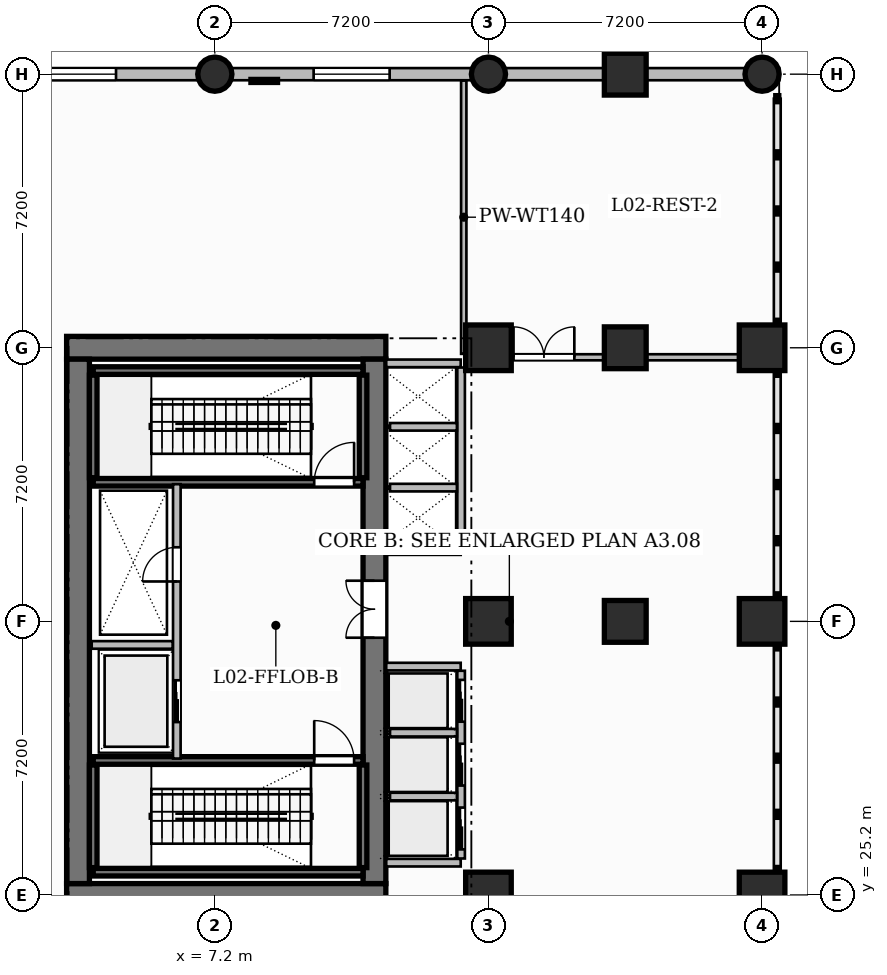
"""IFC4 building model, lengths in metres.
Left out: names, types, materials, properties, quantities, classifications, styles, units other than length and angle.
Written with IfcOpenShell. Run it as: python <this file> out.ifc"""

import sys

from ifc_helpers import new_model, si_unit, direction, frame, frame_2d, origin, origin_2d, place, context, subcontext, project, spatial, rectangle, circle, extrude, source, transform, mapped, element, fill, save


model = new_model("IFC4")
c1 = context("Model", 3, precision=1e-05, world=origin(), true_north=direction((0.0, 1.0)))
c2 = subcontext(c1, "Body", "Model", "MODEL_VIEW")
j1 = project(units=[si_unit("LENGTHUNIT", "METRE"), si_unit("PLANEANGLEUNIT", "RADIAN")], contexts=[c1])
p1 = place(None, origin())
s1 = spatial("IfcSite", under=j1, at=p1, CompositionType="ELEMENT")
p2 = place(p1, origin())
s2 = spatial("IfcBuilding", under=s1, at=p2, CompositionType="ELEMENT")
p3 = place(p2, frame((0.0, 0.0, 10.8)))
s3 = spatial("IfcBuildingStorey", under=s2, at=p3, CompositionType="ELEMENT", Elevation=10.8)
for number, where, z_axis, x_axis in (
    (1, (3.3, 25.2, 0.0), (0.0, 0.0, 1.0), (1.0, 0.0, 0.0)),
    (2, (3.3, 39.6, 0.0), (0.0, 0.0, 1.0), (1.0, 0.0, 0.0)),
):
    element("IfcWall", number, at=place(p3, frame(where, z_axis=z_axis, x_axis=x_axis)), inside=s3, PredefinedType="SHEAR", context=c2, shape_type="SweptSolid", body=[
        extrude(rectangle(XDim=8.4, YDim=0.6, at=frame_2d((4.2, 0.0))), origin(), (0.0, 0.0, 1.0), 5.4),
    ])
p4 = place(p3, frame((3.6, 25.5, 0.0), z_axis=(0.0, 0.0, 1.0), x_axis=(0.0, 1.0, 0.0)))
e3 = element("IfcWall", 3, at=p4, inside=s3, PredefinedType="SHEAR", context=c2, shape_type="SweptSolid", body=[
    extrude(rectangle(XDim=13.8, YDim=0.6, at=frame_2d((6.9, 0.0))), origin(), (0.0, 0.0, 1.0), 5.4),
])
p5 = place(p3, frame((11.4, 25.5, 0.0), z_axis=(0.0, 0.0, 1.0), x_axis=(0.0, 1.0, 0.0)))
e4 = element("IfcWall", 4, at=p5, inside=s3, PredefinedType="SHEAR", context=c2, shape_type="SweptSolid", body=[
    extrude(rectangle(XDim=13.8, YDim=0.6, at=frame_2d((6.9, 0.0))), origin(), (0.0, 0.0, 1.0), 5.4),
])
p6 = place(p5, frame((6.47, 0.0, 0.0)))
e5 = element("IfcOpeningElement", 5, at=p6, cuts=e4, PredefinedType="OPENING", context=c2, shape_type="SweptSolid", body=[
    extrude(rectangle(XDim=1.5, YDim=2.2, at=frame_2d((0.75, 1.1))), frame((0.0, 0.31, 0.0), z_axis=(0.0, -1.0, 0.0), x_axis=(1.0, 0.0, 0.0)), (0.0, 0.0, 1.0), 0.62),
])
m1 = source(origin(), c2, "Body", "SweptSolid", [
    extrude(circle(Radius=0.45, at=origin_2d()), origin(), (0.0, 0.0, 1.0), 5.4),
])
p7 = place(p3, frame((7.2, 46.8, 0.0), z_axis=(0.0, 0.0, 1.0), x_axis=(1.0, 0.0, 0.0)))
e6 = element("IfcColumn", 6, at=p7, inside=s3, PredefinedType="COLUMN", context=c2, shape_type="MappedRepresentation", body=[
    mapped(m1, transform((0.0, 0.0, 0.0), scale=1.0)),
])
m2 = source(origin(), c2, "Body", "SweptSolid", [
    extrude(rectangle(XDim=1.2, YDim=1.2, at=origin_2d()), origin(), (0.0, 0.0, 1.0), 5.4),
])
for number, where, z_axis, x_axis in (
    (7, (14.4, 25.2, 0.0), (0.0, 0.0, 1.0), (1.0, 0.0, 0.0)),
    (8, (14.4, 32.4, 0.0), (0.0, 0.0, 1.0), (1.0, 0.0, 0.0)),
    (9, (14.4, 39.6, 0.0), (0.0, 0.0, 1.0), (1.0, 0.0, 0.0)),
):
    element("IfcColumn", number, at=place(p3, frame(where, z_axis=z_axis, x_axis=x_axis)), inside=s3, PredefinedType="COLUMN", context=c2, shape_type="MappedRepresentation", body=[
        mapped(m2, transform((0.0, 0.0, 0.0), scale=1.0)),
    ])
p8 = place(p3, frame((14.4, 46.8, 0.0), z_axis=(0.0, 0.0, 1.0), x_axis=(1.0, 0.0, 0.0)))
e10 = element("IfcColumn", 10, at=p8, inside=s3, PredefinedType="COLUMN", context=c2, shape_type="MappedRepresentation", body=[
    mapped(m1, transform((0.0, 0.0, 0.0), scale=1.0)),
])
for number, where, z_axis, x_axis in (
    (11, (21.6, 25.2, 0.0), (0.0, 0.0, 1.0), (1.0, 0.0, 0.0)),
    (12, (21.6, 32.4, 0.0), (0.0, 0.0, 1.0), (1.0, 0.0, 0.0)),
    (13, (21.6, 39.6, 0.0), (0.0, 0.0, 1.0), (1.0, 0.0, 0.0)),
):
    element("IfcColumn", number, at=place(p3, frame(where, z_axis=z_axis, x_axis=x_axis)), inside=s3, PredefinedType="COLUMN", context=c2, shape_type="MappedRepresentation", body=[
        mapped(m2, transform((0.0, 0.0, 0.0), scale=1.0)),
    ])
p9 = place(p3, frame((21.6, 46.8, 0.0), z_axis=(0.0, 0.0, 1.0), x_axis=(1.0, 0.0, 0.0)))
e14 = element("IfcColumn", 14, at=p9, inside=s3, PredefinedType="COLUMN", context=c2, shape_type="MappedRepresentation", body=[
    mapped(m1, transform((0.0, 0.0, 0.0), scale=1.0)),
])
m3 = source(origin(), c2, "Body", "SweptSolid", [
    extrude(rectangle(XDim=1.1, YDim=1.1, at=origin_2d()), origin(), (0.0, 0.0, 1.0), 5.4),
])
for number, where, z_axis, x_axis in (
    (15, (18.0, 32.4, 0.0), (0.0, 0.0, 1.0), (1.0, 0.0, 0.0)),
    (16, (18.0, 39.6, 0.0), (0.0, 0.0, 1.0), (1.0, 0.0, 0.0)),
    (17, (18.0, 46.8, 0.0), (0.0, 0.0, 1.0), (1.0, 0.0, 0.0)),
):
    element("IfcColumn", number, at=place(p3, frame(where, z_axis=z_axis, x_axis=x_axis)), inside=s3, PredefinedType="COLUMN", context=c2, shape_type="MappedRepresentation", body=[
        mapped(m3, transform((0.0, 0.0, 0.0), scale=1.0)),
    ])
p10 = place(p3, frame((4.0, 25.8, 0.0), z_axis=(0.0, 0.0, 1.0), x_axis=(1.0, 0.0, 0.0)))
e18 = element("IfcWall", 18, at=p10, inside=s3, PredefinedType="SHEAR", context=c2, shape_type="SweptSolid", body=[
    extrude(rectangle(XDim=7.1, YDim=0.2, at=frame_2d((3.55, 0.0))), origin(), (0.0, 0.0, 1.0), 5.4),
])
for number, where, z_axis, x_axis in (
    (19, (4.0, 25.92, 0.0), (0.0, 0.0, 1.0), (0.0, 1.0, 0.0)),
    (20, (11.1, 25.92, 0.0), (0.0, 0.0, 1.0), (0.0, 1.0, 0.0)),
):
    element("IfcWall", number, at=place(p3, frame(where, z_axis=z_axis, x_axis=x_axis)), inside=s3, PredefinedType="SHEAR", context=c2, shape_type="SweptSolid", body=[
        extrude(rectangle(XDim=2.7, YDim=0.2, at=frame_2d((1.35, 0.0))), origin(), (0.0, 0.0, 1.0), 5.4),
    ])
p11 = place(p3, frame((4.0, 28.74, 0.0), z_axis=(0.0, 0.0, 1.0), x_axis=(1.0, 0.0, 0.0)))
e21 = element("IfcWall", 21, at=p11, inside=s3, PredefinedType="SHEAR", context=c2, shape_type="SweptSolid", body=[
    extrude(rectangle(XDim=7.1, YDim=0.2, at=frame_2d((3.55, 0.0))), origin(), (0.0, 0.0, 1.0), 5.4),
])
p12 = place(p11, frame((5.815, 0.0, 0.0)))
e22 = element("IfcOpeningElement", 22, at=p12, cuts=e21, PredefinedType="OPENING", context=c2, shape_type="SweptSolid", body=[
    extrude(rectangle(XDim=1.05, YDim=2.2, at=frame_2d((0.525, 1.1))), frame((0.0, 0.11, 0.0), z_axis=(0.0, -1.0, 0.0), x_axis=(1.0, 0.0, 0.0)), (0.0, 0.0, 1.0), 0.22),
])
p13 = place(p3, frame((4.0, 39.0, 0.0), z_axis=(0.0, 0.0, 1.0), x_axis=(1.0, 0.0, 0.0)))
e23 = element("IfcWall", 23, at=p13, inside=s3, PredefinedType="SHEAR", context=c2, shape_type="SweptSolid", body=[
    extrude(rectangle(XDim=7.1, YDim=0.2, at=frame_2d((3.55, 0.0))), origin(), (0.0, 0.0, 1.0), 5.4),
])
for number, where, z_axis, x_axis in (
    (24, (4.0, 36.18, 0.0), (0.0, 0.0, 1.0), (0.0, 1.0, 0.0)),
    (25, (11.1, 36.18, 0.0), (0.0, 0.0, 1.0), (0.0, 1.0, 0.0)),
):
    element("IfcWall", number, at=place(p3, frame(where, z_axis=z_axis, x_axis=x_axis)), inside=s3, PredefinedType="SHEAR", context=c2, shape_type="SweptSolid", body=[
        extrude(rectangle(XDim=2.7, YDim=0.2, at=frame_2d((1.35, 0.0))), origin(), (0.0, 0.0, 1.0), 5.4),
    ])
p14 = place(p3, frame((4.0, 36.06, 0.0), z_axis=(0.0, 0.0, 1.0), x_axis=(1.0, 0.0, 0.0)))
e26 = element("IfcWall", 26, at=p14, inside=s3, PredefinedType="SHEAR", context=c2, shape_type="SweptSolid", body=[
    extrude(rectangle(XDim=7.1, YDim=0.2, at=frame_2d((3.55, 0.0))), origin(), (0.0, 0.0, 1.0), 5.4),
])
p15 = place(p14, frame((5.815, 0.0, 0.0)))
e27 = element("IfcOpeningElement", 27, at=p15, cuts=e26, PredefinedType="OPENING", context=c2, shape_type="SweptSolid", body=[
    extrude(rectangle(XDim=1.05, YDim=2.2, at=frame_2d((0.525, 1.1))), frame((0.0, 0.11, 0.0), z_axis=(0.0, -1.0, 0.0), x_axis=(1.0, 0.0, 0.0)), (0.0, 0.0, 1.0), 0.22),
])
p16 = place(p3, frame((6.2, 28.79, 0.0), z_axis=(0.0, 0.0, 1.0), x_axis=(0.0, 1.0, 0.0)))
e28 = element("IfcWall", 28, at=p16, inside=s3, PredefinedType="PARTITIONING", context=c2, shape_type="SweptSolid", body=[
    extrude(rectangle(XDim=7.22, YDim=0.2, at=frame_2d((3.61, 0.0))), origin(), (0.0, 0.0, 1.0), 5.1),
])
p17 = place(p16, frame((4.66, 0.0, 0.0)))
e29 = element("IfcOpeningElement", 29, at=p17, cuts=e28, PredefinedType="OPENING", context=c2, shape_type="SweptSolid", body=[
    extrude(rectangle(XDim=0.9, YDim=2.1, at=frame_2d((0.45, 1.05))), frame((0.0, 0.11, 0.0), z_axis=(0.0, -1.0, 0.0), x_axis=(1.0, 0.0, 0.0)), (0.0, 0.0, 1.0), 0.22),
])
p18 = place(p16, frame((0.96, 0.0, 0.0)))
e30 = element("IfcOpeningElement", 30, at=p18, cuts=e28, PredefinedType="OPENING", context=c2, shape_type="SweptSolid", body=[
    extrude(rectangle(XDim=1.1, YDim=2.2, at=frame_2d((0.55, 1.1))), frame((0.0, 0.11, 0.0), z_axis=(0.0, -1.0, 0.0), x_axis=(1.0, 0.0, 0.0)), (0.0, 0.0, 1.0), 0.22),
])
p19 = place(p3, frame((3.96, 31.78, 0.0), z_axis=(0.0, 0.0, 1.0), x_axis=(1.0, 0.0, 0.0)))
e31 = element("IfcWall", 31, at=p19, inside=s3, PredefinedType="PARTITIONING", context=c2, shape_type="SweptSolid", body=[
    extrude(rectangle(XDim=2.13, YDim=0.2, at=frame_2d((1.065, 0.0))), origin(), (0.0, 0.0, 1.0), 5.1),
])
for number, where, z_axis, x_axis in (
    (32, (11.71, 26.05, 0.0), (0.0, 0.0, 1.0), (1.0, 0.0, 0.0)),
    (33, (11.71, 31.21, 0.0), (0.0, 0.0, 1.0), (1.0, 0.0, 0.0)),
):
    element("IfcWall", number, at=place(p3, frame(where, z_axis=z_axis, x_axis=x_axis)), inside=s3, PredefinedType="PARTITIONING", context=c2, shape_type="SweptSolid", body=[
        extrude(rectangle(XDim=1.96, YDim=0.2, at=frame_2d((0.98, 0.0))), origin(), (0.0, 0.0, 1.0), 5.1),
    ])
p20 = place(p3, frame((13.68, 26.16, 0.0), z_axis=(0.0, 0.0, 1.0), x_axis=(0.0, 1.0, 0.0)))
e34 = element("IfcWall", 34, at=p20, inside=s3, PredefinedType="PARTITIONING", context=c2, shape_type="SweptSolid", body=[
    extrude(rectangle(XDim=4.94, YDim=0.2, at=frame_2d((2.47, 0.0))), origin(), (0.0, 0.0, 1.0), 5.1),
])
p21 = place(p20, frame((0.24, 0.0, 0.0)))
e35 = element("IfcOpeningElement", 35, at=p21, cuts=e34, PredefinedType="OPENING", context=c2, shape_type="SweptSolid", body=[
    extrude(rectangle(XDim=1.1, YDim=2.2, at=frame_2d((0.55, 1.1))), frame((0.0, 0.11, 0.0), z_axis=(0.0, -1.0, 0.0), x_axis=(1.0, 0.0, 0.0)), (0.0, 0.0, 1.0), 0.22),
])
p22 = place(p20, frame((1.92, 0.0, 0.0)))
e36 = element("IfcOpeningElement", 36, at=p22, cuts=e34, PredefinedType="OPENING", context=c2, shape_type="SweptSolid", body=[
    extrude(rectangle(XDim=1.1, YDim=2.2, at=frame_2d((0.55, 1.1))), frame((0.0, 0.11, 0.0), z_axis=(0.0, -1.0, 0.0), x_axis=(1.0, 0.0, 0.0)), (0.0, 0.0, 1.0), 0.22),
])
p23 = place(p20, frame((3.6, 0.0, 0.0)))
e37 = element("IfcOpeningElement", 37, at=p23, cuts=e34, PredefinedType="OPENING", context=c2, shape_type="SweptSolid", body=[
    extrude(rectangle(XDim=1.1, YDim=2.2, at=frame_2d((0.55, 1.1))), frame((0.0, 0.11, 0.0), z_axis=(0.0, -1.0, 0.0), x_axis=(1.0, 0.0, 0.0)), (0.0, 0.0, 1.0), 0.22),
])
for number, where, z_axis, x_axis in (
    (38, (11.81, 27.79, 0.0), (0.0, 0.0, 1.0), (1.0, 0.0, 0.0)),
    (39, (11.81, 29.47, 0.0), (0.0, 0.0, 1.0), (1.0, 0.0, 0.0)),
):
    element("IfcWall", number, at=place(p3, frame(where, z_axis=z_axis, x_axis=x_axis)), inside=s3, PredefinedType="PARTITIONING", context=c2, shape_type="SweptSolid", body=[
        extrude(rectangle(XDim=1.76, YDim=0.2, at=frame_2d((0.88, 0.0))), origin(), (0.0, 0.0, 1.0), 5.1),
    ])
for number, where, z_axis, x_axis in (
    (40, (11.71, 34.25, 0.0), (0.0, 0.0, 1.0), (1.0, 0.0, 0.0)),
    (41, (11.71, 39.19, 0.0), (0.0, 0.0, 1.0), (1.0, 0.0, 0.0)),
):
    element("IfcWall", number, at=place(p3, frame(where, z_axis=z_axis, x_axis=x_axis)), inside=s3, PredefinedType="PARTITIONING", context=c2, shape_type="SweptSolid", body=[
        extrude(rectangle(XDim=1.96, YDim=0.2, at=frame_2d((0.98, 0.0))), origin(), (0.0, 0.0, 1.0), 5.1),
    ])
p24 = place(p3, frame((13.68, 34.36, 0.0), z_axis=(0.0, 0.0, 1.0), x_axis=(0.0, 1.0, 0.0)))
e42 = element("IfcWall", 42, at=p24, inside=s3, PredefinedType="PARTITIONING", context=c2, shape_type="SweptSolid", body=[
    extrude(rectangle(XDim=4.72, YDim=0.2, at=frame_2d((2.36, 0.0))), origin(), (0.0, 0.0, 1.0), 5.1),
])
for number, where, z_axis, x_axis in (
    (43, (11.81, 35.92, 0.0), (0.0, 0.0, 1.0), (1.0, 0.0, 0.0)),
    (44, (11.81, 37.52, 0.0), (0.0, 0.0, 1.0), (1.0, 0.0, 0.0)),
):
    element("IfcWall", number, at=place(p3, frame(where, z_axis=z_axis, x_axis=x_axis)), inside=s3, PredefinedType="PARTITIONING", context=c2, shape_type="SweptSolid", body=[
        extrude(rectangle(XDim=1.76, YDim=0.2, at=frame_2d((0.88, 0.0))), origin(), (0.0, 0.0, 1.0), 5.1),
    ])
p25 = place(p3, frame((13.75, 39.44, 0.0), z_axis=(0.0, 0.0, 1.0), x_axis=(0.0, 1.0, 0.0)))
e45 = element("IfcWall", 45, at=p25, inside=s3, PredefinedType="PARTITIONING", context=c2, shape_type="SweptSolid", body=[
    extrude(rectangle(XDim=7.192, YDim=0.14, at=frame_2d((3.596, 0.0))), origin(), (0.0, 0.0, 1.0), 5.1),
])
p26 = place(p3, frame((13.84, 39.35, 0.0), z_axis=(0.0, 0.0, 1.0), x_axis=(1.0, 0.0, 0.0)))
e46 = element("IfcWall", 46, at=p26, inside=s3, PredefinedType="PARTITIONING", context=c2, shape_type="SweptSolid", body=[
    extrude(rectangle(XDim=7.92, YDim=0.16, at=frame_2d((3.96, 0.0))), origin(), (0.0, 0.0, 1.0), 4.185),
])
p27 = place(p26, frame((1.22, 0.0, 0.0)))
e47 = element("IfcOpeningElement", 47, at=p27, cuts=e46, PredefinedType="OPENING", context=c2, shape_type="SweptSolid", body=[
    extrude(rectangle(XDim=1.6, YDim=2.4, at=frame_2d((0.8, 1.2))), frame((0.0, 0.09, 0.0), z_axis=(0.0, -1.0, 0.0), x_axis=(1.0, 0.0, 0.0)), (0.0, 0.0, 1.0), 0.18),
])
p28 = place(p3, frame((-4.8, 46.8, 0.0), z_axis=(0.0, 0.0, 1.0), x_axis=(1.0, 0.0, 0.0)))
e48 = element("IfcWall", 48, at=p28, inside=s3, PredefinedType="SOLIDWALL", context=c2, shape_type="SweptSolid", body=[
    extrude(rectangle(XDim=26.85, YDim=0.32, at=frame_2d((13.425, 0.0))), origin(), (0.0, 0.0, 1.0), 4.185),
])
p29 = place(p28, frame((1.4, 0.0, 0.75)))
e49 = element("IfcOpeningElement", 49, at=p29, cuts=e48, PredefinedType="OPENING", context=c2, shape_type="SweptSolid", body=[
    extrude(rectangle(XDim=2.0, YDim=2.6, at=frame_2d((1.0, 1.3))), frame((0.0, 0.17, 0.0), z_axis=(0.0, -1.0, 0.0), x_axis=(1.0, 0.0, 0.0)), (0.0, 0.0, 1.0), 0.34),
])
p30 = place(p28, frame((7.4, 0.0, 0.75)))
e50 = element("IfcOpeningElement", 50, at=p30, cuts=e48, PredefinedType="OPENING", context=c2, shape_type="SweptSolid", body=[
    extrude(rectangle(XDim=2.0, YDim=2.6, at=frame_2d((1.0, 1.3))), frame((0.0, 0.17, 0.0), z_axis=(0.0, -1.0, 0.0), x_axis=(1.0, 0.0, 0.0)), (0.0, 0.0, 1.0), 0.34),
])
p31 = place(p28, frame((14.6, 0.0, 0.75)))
e51 = element("IfcOpeningElement", 51, at=p31, cuts=e48, PredefinedType="OPENING", context=c2, shape_type="SweptSolid", body=[
    extrude(rectangle(XDim=2.0, YDim=2.6, at=frame_2d((1.0, 1.3))), frame((0.0, 0.17, 0.0), z_axis=(0.0, -1.0, 0.0), x_axis=(1.0, 0.0, 0.0)), (0.0, 0.0, 1.0), 0.34),
])
m4 = source(origin(), c2, "Body", "SweptSolid", [
    extrude(rectangle(XDim=1.05, YDim=2.2, at=frame_2d((0.525, 1.1))), frame((0.0, 0.025, 0.0), z_axis=(0.0, -1.0, 0.0), x_axis=(1.0, 0.0, 0.0)), (0.0, 0.0, 1.0), 0.05),
])
p32 = place(p12, origin())
e52 = element("IfcDoor", 52, at=p32, inside=s3, OperationType="SINGLE_SWING_LEFT", PredefinedType="DOOR", context=c2, shape_type="MappedRepresentation", body=[
    mapped(m4, transform((0.0, 0.0, 0.0), scale=1.0)),
])
fill(e22, e52)
p33 = place(p15, origin())
e53 = element("IfcDoor", 53, at=p33, inside=s3, OperationType="SINGLE_SWING_RIGHT", PredefinedType="DOOR", context=c2, shape_type="MappedRepresentation", body=[
    mapped(m4, transform((0.0, 0.0, 0.0), scale=1.0)),
])
fill(e27, e53)
m5 = source(origin(), c2, "Body", "SweptSolid", [
    extrude(rectangle(XDim=0.9, YDim=2.1, at=frame_2d((0.45, 1.05))), frame((0.0, 0.025, 0.0), z_axis=(0.0, -1.0, 0.0), x_axis=(1.0, 0.0, 0.0)), (0.0, 0.0, 1.0), 0.05),
])
p34 = place(p17, origin())
e54 = element("IfcDoor", 54, at=p34, inside=s3, OperationType="SINGLE_SWING_LEFT", PredefinedType="DOOR", context=c2, shape_type="MappedRepresentation", body=[
    mapped(m5, transform((0.0, 0.0, 0.0), scale=1.0)),
])
fill(e29, e54)
m6 = source(origin(), c2, "Body", "SweptSolid", [
    extrude(rectangle(XDim=1.5, YDim=2.2, at=frame_2d((0.75, 1.1))), frame((0.0, 0.025, 0.0), z_axis=(0.0, -1.0, 0.0), x_axis=(1.0, 0.0, 0.0)), (0.0, 0.0, 1.0), 0.05),
])
p35 = place(p6, origin())
e55 = element("IfcDoor", 55, at=p35, inside=s3, OperationType="DOUBLE_DOOR_SINGLE_SWING", PredefinedType="DOOR", context=c2, shape_type="MappedRepresentation", body=[
    mapped(m6, transform((0.0, 0.0, 0.0), scale=1.0)),
])
fill(e5, e55)
m7 = source(origin(), c2, "Body", "SweptSolid", [
    extrude(rectangle(XDim=1.6, YDim=2.4, at=frame_2d((0.8, 1.2))), frame((0.0, 0.025, 0.0), z_axis=(0.0, -1.0, 0.0), x_axis=(1.0, 0.0, 0.0)), (0.0, 0.0, 1.0), 0.05),
])
p36 = place(p27, origin())
e56 = element("IfcDoor", 56, at=p36, inside=s3, OperationType="DOUBLE_DOOR_SINGLE_SWING", PredefinedType="DOOR", context=c2, shape_type="MappedRepresentation", body=[
    mapped(m7, transform((0.0, 0.0, 0.0), scale=1.0)),
])
fill(e47, e56)
m8 = source(origin(), c2, "Body", "SweptSolid", [
    extrude(rectangle(XDim=1.1, YDim=2.2, at=frame_2d((0.55, 1.1))), frame((0.0, 0.025, 0.0), z_axis=(0.0, -1.0, 0.0), x_axis=(1.0, 0.0, 0.0)), (0.0, 0.0, 1.0), 0.05),
])
p37 = place(p18, origin())
e57 = element("IfcDoor", 57, at=p37, inside=s3, OperationType="SLIDING_TO_LEFT", PredefinedType="DOOR", context=c2, shape_type="MappedRepresentation", body=[
    mapped(m8, transform((0.0, 0.0, 0.0), scale=1.0)),
])
fill(e30, e57)
p38 = place(p21, origin())
e58 = element("IfcDoor", 58, at=p38, inside=s3, OperationType="SLIDING_TO_LEFT", PredefinedType="DOOR", context=c2, shape_type="MappedRepresentation", body=[
    mapped(m8, transform((0.0, 0.0, 0.0), scale=1.0)),
])
fill(e35, e58)
p39 = place(p22, origin())
e59 = element("IfcDoor", 59, at=p39, inside=s3, OperationType="SLIDING_TO_LEFT", PredefinedType="DOOR", context=c2, shape_type="MappedRepresentation", body=[
    mapped(m8, transform((0.0, 0.0, 0.0), scale=1.0)),
])
fill(e36, e59)
p40 = place(p23, origin())
e60 = element("IfcDoor", 60, at=p40, inside=s3, OperationType="SLIDING_TO_LEFT", PredefinedType="DOOR", context=c2, shape_type="MappedRepresentation", body=[
    mapped(m8, transform((0.0, 0.0, 0.0), scale=1.0)),
])
fill(e37, e60)
m9 = source(origin(), c2, "Body", "SweptSolid", [
    extrude(rectangle(XDim=2.0, YDim=2.6, at=frame_2d((1.0, 1.3))), frame((0.0, 0.03, 0.0), z_axis=(0.0, -1.0, 0.0), x_axis=(1.0, 0.0, 0.0)), (0.0, 0.0, 1.0), 0.06),
])
p41 = place(p30, origin())
e61 = element("IfcWindow", 61, at=p41, inside=s3, PartitioningType="DOUBLE_PANEL_VERTICAL", PredefinedType="WINDOW", context=c2, shape_type="MappedRepresentation", body=[
    mapped(m9, transform((0.0, 0.0, 0.0), scale=1.0)),
])
fill(e50, e61)
p42 = place(p31, origin())
e62 = element("IfcWindow", 62, at=p42, inside=s3, PartitioningType="DOUBLE_PANEL_VERTICAL", PredefinedType="WINDOW", context=c2, shape_type="MappedRepresentation", body=[
    mapped(m9, transform((0.0, 0.0, 0.0), scale=1.0)),
])
fill(e51, e62)
save(model, sys.argv[1])
